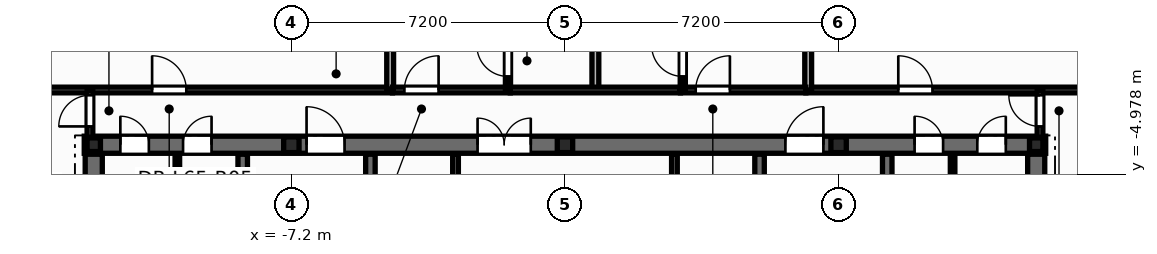
"""IFC4 building model, lengths in metres.
Left out: names, types, materials, properties, quantities, classifications, styles, units other than length and angle.
Written with IfcOpenShell. Run it as: python <this file> out.ifc"""

import sys

from ifc_helpers import new_model, si_unit, direction, frame, frame_2d, origin, origin_2d, place, context, subcontext, project, spatial, rectangle, i_section, extrude, element, fill, save


model = new_model("IFC4")
c1 = context("Model", 3, precision=1e-05, world=origin(), true_north=direction((0.0, 1.0)))
c2 = subcontext(c1, "Body", "Model", "MODEL_VIEW")
j1 = project(units=[si_unit("LENGTHUNIT", "METRE"), si_unit("PLANEANGLEUNIT", "RADIAN")], contexts=[c1])
p1 = place(None, origin())
s1 = spatial("IfcSite", under=j1, at=p1, CompositionType="ELEMENT")
p2 = place(p1, origin())
s2 = spatial("IfcBuilding", under=s1, at=p2, CompositionType="ELEMENT")
p3 = place(p2, frame((0.0, 0.0, 249.0)))
s3 = spatial("IfcBuildingStorey", under=s2, at=p3, CompositionType="ELEMENT", Elevation=249.0)
for number, where, z_axis, x_axis in (
    (1, (12.4, -4.2, 0.0), (0.0, 0.0, 1.0), (1.0, 0.0, 0.0)),
    (2, (-12.4, -4.2, 0.0), (0.0, 0.0, 1.0), (1.0, 0.0, 0.0)),
):
    element("IfcColumn", number, at=place(p3, frame(where, z_axis=z_axis, x_axis=x_axis)), inside=s3, PredefinedType="COLUMN", context=c2, shape_type="SweptSolid", body=[
        extrude(i_section(OverallWidth=0.352, OverallDepth=0.359, WebThickness=0.018, FlangeThickness=0.026, at=origin_2d()), origin(), (0.0, 0.0, 1.0), 3.6),
    ])
for number, where, z_axis, x_axis in (
    (3, (-7.2, -4.2, 0.0), (0.0, 0.0, 1.0), (1.0, 0.0, 0.0)),
    (4, (0.0, -4.2, 0.0), (0.0, 0.0, 1.0), (1.0, 0.0, 0.0)),
    (5, (7.2, -4.2, 0.0), (0.0, 0.0, 1.0), (1.0, 0.0, 0.0)),
):
    element("IfcColumn", number, at=place(p3, frame(where, z_axis=z_axis, x_axis=x_axis)), inside=s3, PredefinedType="PILASTER", context=c2, shape_type="SweptSolid", body=[
        extrude(i_section(OverallWidth=0.405, OverallDepth=0.414, WebThickness=0.022, FlangeThickness=0.032, at=origin_2d()), origin(), (0.0, 0.0, 1.0), 3.6),
    ])
p4 = place(p3, frame((-11.468, 1.637, -0.2), z_axis=(0.0, 0.0, 1.0), x_axis=(-0.582200027891, -0.813045587605, 0.0)))
e6 = element("IfcWall", 6, at=p4, inside=s3, PredefinedType="PARAPET", context=c2, shape_type="SweptSolid", body=[
    extrude(rectangle(XDim=16.608, YDim=0.36, at=frame_2d((8.304, 0.0))), origin(), (0.0, 0.0, 1.0), 0.38),
])
p5 = place(p3, frame((-2.88, -7.1, 0.0), z_axis=(0.0, 0.0, 1.0), x_axis=(0.0, 1.0, 0.0)))
e7 = element("IfcWall", 7, at=p5, inside=s3, PredefinedType="PARTITIONING", context=c2, shape_type="SweptSolid", body=[
    extrude(rectangle(XDim=2.65, YDim=0.15, at=frame_2d((1.325, 0.0))), origin(), (0.0, 0.0, 1.0), 3.345),
])
p6 = place(p5, frame((0.85, 0.0, 0.0)))
e8 = element("IfcOpeningElement", 8, at=p6, cuts=e7, PredefinedType="OPENING", context=c2, shape_type="SweptSolid", body=[
    extrude(rectangle(XDim=0.886, YDim=2.104, at=frame_2d((0.44, 1.052))), frame((0.0, 0.085, 0.0), z_axis=(0.0, -1.0, 0.0), x_axis=(1.0, 0.0, 0.0)), (0.0, 0.0, 1.0), 0.17),
])
p7 = place(p3, frame((2.88, -7.1, 0.0), z_axis=(0.0, 0.0, 1.0), x_axis=(0.0, 1.0, 0.0)))
e9 = element("IfcWall", 9, at=p7, inside=s3, PredefinedType="PARTITIONING", context=c2, shape_type="SweptSolid", body=[
    extrude(rectangle(XDim=2.65, YDim=0.15, at=frame_2d((1.325, 0.0))), origin(), (0.0, 0.0, 1.0), 3.345),
])
p8 = place(p7, frame((0.85, 0.0, 0.0)))
e10 = element("IfcOpeningElement", 10, at=p8, cuts=e9, PredefinedType="OPENING", context=c2, shape_type="SweptSolid", body=[
    extrude(rectangle(XDim=0.886, YDim=2.104, at=frame_2d((0.44, 1.052))), frame((0.0, 0.085, 0.0), z_axis=(0.0, -1.0, 0.0), x_axis=(1.0, 0.0, 0.0)), (0.0, 0.0, 1.0), 0.17),
])
for number, where, z_axis, x_axis in (
    (11, (-10.2, -5.52, 0.0), (0.0, 0.0, 1.0), (0.0, 1.0, 0.0)),
    (12, (10.2, -5.52, 0.0), (0.0, 0.0, 1.0), (0.0, 1.0, 0.0)),
):
    element("IfcWall", number, at=place(p3, frame(where, z_axis=z_axis, x_axis=x_axis)), inside=s3, PredefinedType="PARTITIONING", context=c2, shape_type="SweptSolid", body=[
        extrude(rectangle(XDim=1.12, YDim=0.12, at=frame_2d((0.56, 0.0))), origin(), (0.0, 0.0, 1.0), 3.345),
    ])
p9 = place(p3, frame((-12.65, -4.2, 0.0), z_axis=(0.0, 0.0, 1.0), x_axis=(1.0, 0.0, 0.0)))
e13 = element("IfcWall", 13, at=p9, inside=s3, PredefinedType="SHEAR", context=c2, shape_type="SweptSolid", body=[
    extrude(rectangle(XDim=25.3, YDim=0.45, at=frame_2d((12.65, 0.0))), origin(), (0.0, 0.0, 1.0), 3.6),
])
p10 = place(p9, frame((0.95, 0.0, 0.0)))
e14 = element("IfcOpeningElement", 14, at=p10, cuts=e13, PredefinedType="OPENING", context=c2, shape_type="SweptSolid", body=[
    extrude(rectangle(XDim=0.756, YDim=2.054, at=frame_2d((0.375, 1.027))), frame((0.0, 0.235, 0.0), z_axis=(0.0, -1.0, 0.0), x_axis=(1.0, 0.0, 0.0)), (0.0, 0.0, 1.0), 0.47),
])
p11 = place(p9, frame((2.6, 0.0, 0.0)))
e15 = element("IfcOpeningElement", 15, at=p11, cuts=e13, PredefinedType="OPENING", context=c2, shape_type="SweptSolid", body=[
    extrude(rectangle(XDim=0.756, YDim=2.054, at=frame_2d((0.375, 1.027))), frame((0.0, 0.235, 0.0), z_axis=(0.0, -1.0, 0.0), x_axis=(1.0, 0.0, 0.0)), (0.0, 0.0, 1.0), 0.47),
])
p12 = place(p9, frame((21.85, 0.0, 0.0)))
e16 = element("IfcOpeningElement", 16, at=p12, cuts=e13, PredefinedType="OPENING", context=c2, shape_type="SweptSolid", body=[
    extrude(rectangle(XDim=0.756, YDim=2.054, at=frame_2d((0.375, 1.027))), frame((0.0, 0.235, 0.0), z_axis=(0.0, -1.0, 0.0), x_axis=(1.0, 0.0, 0.0)), (0.0, 0.0, 1.0), 0.47),
])
p13 = place(p9, frame((23.5, 0.0, 0.0)))
e17 = element("IfcOpeningElement", 17, at=p13, cuts=e13, PredefinedType="OPENING", context=c2, shape_type="SweptSolid", body=[
    extrude(rectangle(XDim=0.756, YDim=2.054, at=frame_2d((0.375, 1.027))), frame((0.0, 0.235, 0.0), z_axis=(0.0, -1.0, 0.0), x_axis=(1.0, 0.0, 0.0)), (0.0, 0.0, 1.0), 0.47),
])
p14 = place(p9, frame((5.85, 0.0, 0.0)))
e18 = element("IfcOpeningElement", 18, at=p14, cuts=e13, PredefinedType="OPENING", context=c2, shape_type="SweptSolid", body=[
    extrude(rectangle(XDim=1.006, YDim=2.104, at=frame_2d((0.5, 1.052))), frame((0.0, 0.235, 0.0), z_axis=(0.0, -1.0, 0.0), x_axis=(1.0, 0.0, 0.0)), (0.0, 0.0, 1.0), 0.47),
])
p15 = place(p9, frame((10.35, 0.0, 0.0)))
e19 = element("IfcOpeningElement", 19, at=p15, cuts=e13, PredefinedType="OPENING", context=c2, shape_type="SweptSolid", body=[
    extrude(rectangle(XDim=1.406, YDim=2.154, at=frame_2d((0.7, 1.077))), frame((0.0, 0.235, 0.0), z_axis=(0.0, -1.0, 0.0), x_axis=(1.0, 0.0, 0.0)), (0.0, 0.0, 1.0), 0.47),
])
p16 = place(p9, frame((18.45, 0.0, 0.0)))
e20 = element("IfcOpeningElement", 20, at=p16, cuts=e13, PredefinedType="OPENING", context=c2, shape_type="SweptSolid", body=[
    extrude(rectangle(XDim=1.006, YDim=2.104, at=frame_2d((0.5, 1.052))), frame((0.0, 0.235, 0.0), z_axis=(0.0, -1.0, 0.0), x_axis=(1.0, 0.0, 0.0)), (0.0, 0.0, 1.0), 0.47),
])
p17 = place(p3, frame((-8.48, -13.85, 0.0), z_axis=(0.0, 0.0, 1.0), x_axis=(0.0, 1.0, 0.0)))
e21 = element("IfcWall", 21, at=p17, inside=s3, PredefinedType="SHEAR", context=c2, shape_type="SweptSolid", body=[
    extrude(rectangle(XDim=9.4, YDim=0.25, at=frame_2d((4.7, 0.0))), origin(), (0.0, 0.0, 1.0), 3.6),
])
p18 = place(p17, frame((6.95, 0.0, 0.0)))
e22 = element("IfcOpeningElement", 22, at=p18, cuts=e21, PredefinedType="OPENING", context=c2, shape_type="SweptSolid", body=[
    extrude(rectangle(XDim=1.006, YDim=2.104, at=frame_2d((0.5, 1.052))), frame((0.0, 0.135, 0.0), z_axis=(0.0, -1.0, 0.0), x_axis=(1.0, 0.0, 0.0)), (0.0, 0.0, 1.0), 0.27),
])
p19 = place(p3, frame((8.48, -13.85, 0.0), z_axis=(0.0, 0.0, 1.0), x_axis=(0.0, 1.0, 0.0)))
e23 = element("IfcWall", 23, at=p19, inside=s3, PredefinedType="SHEAR", context=c2, shape_type="SweptSolid", body=[
    extrude(rectangle(XDim=9.4, YDim=0.25, at=frame_2d((4.7, 0.0))), origin(), (0.0, 0.0, 1.0), 3.6),
])
p20 = place(p19, frame((6.95, 0.0, 0.0)))
e24 = element("IfcOpeningElement", 24, at=p20, cuts=e23, PredefinedType="OPENING", context=c2, shape_type="SweptSolid", body=[
    extrude(rectangle(XDim=1.006, YDim=2.104, at=frame_2d((0.5, 1.052))), frame((0.0, 0.135, 0.0), z_axis=(0.0, -1.0, 0.0), x_axis=(1.0, 0.0, 0.0)), (0.0, 0.0, 1.0), 0.27),
])
for number, where, z_axis, x_axis in (
    (25, (-5.12, -13.85, 0.0), (0.0, 0.0, 1.0), (0.0, 1.0, 0.0)),
    (26, (5.12, -13.85, 0.0), (0.0, 0.0, 1.0), (0.0, 1.0, 0.0)),
):
    element("IfcWall", number, at=place(p3, frame(where, z_axis=z_axis, x_axis=x_axis)), inside=s3, PredefinedType="SHEAR", context=c2, shape_type="SweptSolid", body=[
        extrude(rectangle(XDim=9.4, YDim=0.25, at=frame_2d((4.7, 0.0))), origin(), (0.0, 0.0, 1.0), 3.6),
    ])
for number, where, z_axis, x_axis in (
    (27, (-12.4, -13.85, 0.0), (0.0, 0.0, 1.0), (0.0, 1.0, 0.0)),
    (28, (12.4, -13.85, 0.0), (0.0, 0.0, 1.0), (0.0, 1.0, 0.0)),
):
    element("IfcWall", number, at=place(p3, frame(where, z_axis=z_axis, x_axis=x_axis)), inside=s3, PredefinedType="SHEAR", context=c2, shape_type="SweptSolid", body=[
        extrude(rectangle(XDim=9.4, YDim=0.45, at=frame_2d((4.7, 0.0))), origin(), (0.0, 0.0, 1.0), 3.6),
    ])
p21 = place(p3, frame((-14.42, -2.76, 0.0), z_axis=(0.0, 0.0, 1.0), x_axis=(1.0, 0.0, 0.0)))
e29 = element("IfcWall", 29, at=p21, inside=s3, PredefinedType="PARTITIONING", context=c2, shape_type="SweptSolid", body=[
    extrude(rectangle(XDim=9.88, YDim=0.15, at=frame_2d((4.94, 0.0))), origin(), (0.0, 0.0, 1.0), 2.32),
])
p22 = place(p21, frame((3.555, 0.0, 0.0)))
e30 = element("IfcOpeningElement", 30, at=p22, cuts=e29, PredefinedType="OPENING", context=c2, shape_type="SweptSolid", body=[
    extrude(rectangle(XDim=0.906, YDim=2.104, at=frame_2d((0.45, 1.052))), frame((0.0, 0.085, 0.0), z_axis=(0.0, -1.0, 0.0), x_axis=(1.0, 0.0, 0.0)), (0.0, 0.0, 1.0), 0.17),
])
p23 = place(p3, frame((6.34, -2.76, 0.0), z_axis=(0.0, 0.0, 1.0), x_axis=(1.0, 0.0, 0.0)))
e31 = element("IfcWall", 31, at=p23, inside=s3, PredefinedType="PARTITIONING", context=c2, shape_type="SweptSolid", body=[
    extrude(rectangle(XDim=8.08, YDim=0.15, at=frame_2d((4.04, 0.0))), origin(), (0.0, 0.0, 1.0), 2.32),
])
p24 = place(p23, frame((2.431, 0.0, 0.0)))
e32 = element("IfcOpeningElement", 32, at=p24, cuts=e31, PredefinedType="OPENING", context=c2, shape_type="SweptSolid", body=[
    extrude(rectangle(XDim=0.906, YDim=2.104, at=frame_2d((0.45, 1.052))), frame((0.0, 0.085, 0.0), z_axis=(0.0, -1.0, 0.0), x_axis=(1.0, 0.0, 0.0)), (0.0, 0.0, 1.0), 0.17),
])
p25 = place(p3, frame((-4.6, -2.74, 0.0), z_axis=(0.0, 0.0, 1.0), x_axis=(0.0, 1.0, 0.0)))
e33 = element("IfcWall", 33, at=p25, inside=s3, PredefinedType="PARTITIONING", context=c2, shape_type="SweptSolid", body=[
    extrude(rectangle(XDim=12.74, YDim=0.18, at=frame_2d((6.37, 0.0))), origin(), (0.0, 0.0, 1.0), 2.32),
])
p26 = place(p3, frame((6.4, -2.76, 0.0), z_axis=(0.0, 0.0, 1.0), x_axis=(0.0, 1.0, 0.0)))
e34 = element("IfcWall", 34, at=p26, inside=s3, PredefinedType="PARTITIONING", context=c2, shape_type="SweptSolid", body=[
    extrude(rectangle(XDim=11.2, YDim=0.18, at=frame_2d((5.6, 0.0))), origin(), (0.0, 0.0, 1.0), 2.32),
])
p27 = place(p3, frame((0.8, -2.76, 0.0), z_axis=(0.0, 0.0, 1.0), x_axis=(0.0, 1.0, 0.0)))
e35 = element("IfcWall", 35, at=p27, inside=s3, PredefinedType="PARTITIONING", context=c2, shape_type="SweptSolid", body=[
    extrude(rectangle(XDim=16.697, YDim=0.18, at=frame_2d((8.348, 0.0))), origin(), (0.0, 0.0, 1.0), 2.32),
])
p28 = place(p3, frame((3.04, -2.76, 0.0), z_axis=(0.0, 0.0, 1.0), x_axis=(1.0, 0.0, 0.0)))
e36 = element("IfcWall", 36, at=p28, inside=s3, PredefinedType="PARTITIONING", context=c2, shape_type="SweptSolid", body=[
    extrude(rectangle(XDim=3.298, YDim=0.15, at=frame_2d((1.649, 0.0))), origin(), (0.0, 0.0, 1.0), 2.964),
])
p29 = place(p28, frame((0.4, 0.0, 0.0)))
e37 = element("IfcOpeningElement", 37, at=p29, cuts=e36, PredefinedType="OPENING", context=c2, shape_type="SweptSolid", body=[
    extrude(rectangle(XDim=0.906, YDim=2.104, at=frame_2d((0.45, 1.052))), frame((0.0, 0.085, 0.0), z_axis=(0.0, -1.0, 0.0), x_axis=(1.0, 0.0, 0.0)), (0.0, 0.0, 1.0), 0.17),
])
p30 = place(p3, frame((-4.538, -2.76, 0.0), z_axis=(0.0, 0.0, 1.0), x_axis=(1.0, 0.0, 0.0)))
e38 = element("IfcWall", 38, at=p30, inside=s3, PredefinedType="PARTITIONING", context=c2, shape_type="SweptSolid", body=[
    extrude(rectangle(XDim=3.098, YDim=0.15, at=frame_2d((1.549, 0.0))), origin(), (0.0, 0.0, 1.0), 2.964),
])
p31 = place(p30, frame((0.312, 0.0, 0.0)))
e39 = element("IfcOpeningElement", 39, at=p31, cuts=e38, PredefinedType="OPENING", context=c2, shape_type="SweptSolid", body=[
    extrude(rectangle(XDim=0.906, YDim=2.104, at=frame_2d((0.45, 1.052))), frame((0.0, 0.085, 0.0), z_axis=(0.0, -1.0, 0.0), x_axis=(1.0, 0.0, 0.0)), (0.0, 0.0, 1.0), 0.17),
])
p32 = place(p3, frame((-1.5, -2.76, 0.0), z_axis=(0.0, 0.0, 1.0), x_axis=(0.0, 1.0, 0.0)))
e40 = element("IfcWall", 40, at=p32, inside=s3, PredefinedType="PARTITIONING", context=c2, shape_type="SweptSolid", body=[
    extrude(rectangle(XDim=2.92, YDim=0.135, at=frame_2d((1.46, 0.0))), origin(), (0.0, 0.0, 1.0), 3.345),
])
p33 = place(p32, frame((0.357, 0.0, 0.0)))
e41 = element("IfcOpeningElement", 41, at=p33, cuts=e40, PredefinedType="OPENING", context=c2, shape_type="SweptSolid", body=[
    extrude(rectangle(XDim=0.826, YDim=2.104, at=frame_2d((0.41, 1.052))), frame((0.0, 0.078, 0.0), z_axis=(0.0, -1.0, 0.0), x_axis=(1.0, 0.0, 0.0)), (0.0, 0.0, 1.0), 0.155),
])
p34 = place(p3, frame((3.1, -2.76, 0.0), z_axis=(0.0, 0.0, 1.0), x_axis=(0.0, 1.0, 0.0)))
e42 = element("IfcWall", 42, at=p34, inside=s3, PredefinedType="PARTITIONING", context=c2, shape_type="SweptSolid", body=[
    extrude(rectangle(XDim=2.92, YDim=0.135, at=frame_2d((1.46, 0.0))), origin(), (0.0, 0.0, 1.0), 3.345),
])
p35 = place(p34, frame((0.357, 0.0, 0.0)))
e43 = element("IfcOpeningElement", 43, at=p35, cuts=e42, PredefinedType="OPENING", context=c2, shape_type="SweptSolid", body=[
    extrude(rectangle(XDim=0.826, YDim=2.104, at=frame_2d((0.41, 1.052))), frame((0.0, 0.078, 0.0), z_axis=(0.0, -1.0, 0.0), x_axis=(1.0, 0.0, 0.0)), (0.0, 0.0, 1.0), 0.155),
])
p36 = place(p3, frame((-1.438, -2.76, 0.0), z_axis=(0.0, 0.0, 1.0), x_axis=(1.0, 0.0, 0.0)))
e44 = element("IfcWall", 44, at=p36, inside=s3, PredefinedType="PARTITIONING", context=c2, shape_type="SweptSolid", body=[
    extrude(rectangle(XDim=4.476, YDim=0.15, at=frame_2d((2.238, 0.0))), origin(), (0.0, 0.0, 1.0), 2.32),
])
p37 = place(p3, frame((-12.5, -4.24, 0.0), z_axis=(0.0, 0.0, 1.0), x_axis=(0.0, 1.0, 0.0)))
e45 = element("IfcWall", 45, at=p37, inside=s3, PredefinedType="PARTITIONING", context=c2, shape_type="SweptSolid", body=[
    extrude(rectangle(XDim=1.48, YDim=0.15, at=frame_2d((0.74, 0.0))), origin(), (0.0, 0.0, 1.0), 2.32),
])
p38 = place(p37, frame((0.522, 0.0, 0.0)))
e46 = element("IfcOpeningElement", 46, at=p38, cuts=e45, PredefinedType="OPENING", context=c2, shape_type="SweptSolid", body=[
    extrude(rectangle(XDim=0.826, YDim=2.104, at=frame_2d((0.41, 1.052))), frame((0.0, 0.085, 0.0), z_axis=(0.0, -1.0, 0.0), x_axis=(1.0, 0.0, 0.0)), (0.0, 0.0, 1.0), 0.17),
])
p39 = place(p3, frame((12.5, -4.24, 0.0), z_axis=(0.0, 0.0, 1.0), x_axis=(0.0, 1.0, 0.0)))
e47 = element("IfcWall", 47, at=p39, inside=s3, PredefinedType="PARTITIONING", context=c2, shape_type="SweptSolid", body=[
    extrude(rectangle(XDim=1.48, YDim=0.15, at=frame_2d((0.74, 0.0))), origin(), (0.0, 0.0, 1.0), 2.32),
])
p40 = place(p39, frame((0.522, 0.0, 0.0)))
e48 = element("IfcOpeningElement", 48, at=p40, cuts=e47, PredefinedType="OPENING", context=c2, shape_type="SweptSolid", body=[
    extrude(rectangle(XDim=0.826, YDim=2.104, at=frame_2d((0.41, 1.052))), frame((0.0, 0.085, 0.0), z_axis=(0.0, -1.0, 0.0), x_axis=(1.0, 0.0, 0.0)), (0.0, 0.0, 1.0), 0.17),
])
p41 = place(p10, origin())
e49 = element("IfcDoor", 49, at=p41, inside=s3, OperationType="SINGLE_SWING_LEFT", PredefinedType="DOOR", context=c2, shape_type="SweptSolid", body=[
    extrude(rectangle(XDim=0.75, YDim=2.05, at=frame_2d((0.375, 1.025))), frame((0.0, 0.025, 0.0), z_axis=(0.0, -1.0, 0.0), x_axis=(1.0, 0.0, 0.0)), (0.0, 0.0, 1.0), 0.05),
])
fill(e14, e49)
p42 = place(p11, origin())
e50 = element("IfcDoor", 50, at=p42, inside=s3, OperationType="SINGLE_SWING_RIGHT", PredefinedType="DOOR", context=c2, shape_type="SweptSolid", body=[
    extrude(rectangle(XDim=0.75, YDim=2.05, at=frame_2d((0.375, 1.025))), frame((0.0, 0.025, 0.0), z_axis=(0.0, -1.0, 0.0), x_axis=(1.0, 0.0, 0.0)), (0.0, 0.0, 1.0), 0.05),
])
fill(e15, e50)
p43 = place(p12, origin())
e51 = element("IfcDoor", 51, at=p43, inside=s3, OperationType="SINGLE_SWING_LEFT", PredefinedType="DOOR", context=c2, shape_type="SweptSolid", body=[
    extrude(rectangle(XDim=0.75, YDim=2.05, at=frame_2d((0.375, 1.025))), frame((0.0, 0.025, 0.0), z_axis=(0.0, -1.0, 0.0), x_axis=(1.0, 0.0, 0.0)), (0.0, 0.0, 1.0), 0.05),
])
fill(e16, e51)
p44 = place(p13, origin())
e52 = element("IfcDoor", 52, at=p44, inside=s3, OperationType="SINGLE_SWING_RIGHT", PredefinedType="DOOR", context=c2, shape_type="SweptSolid", body=[
    extrude(rectangle(XDim=0.75, YDim=2.05, at=frame_2d((0.375, 1.025))), frame((0.0, 0.025, 0.0), z_axis=(0.0, -1.0, 0.0), x_axis=(1.0, 0.0, 0.0)), (0.0, 0.0, 1.0), 0.05),
])
fill(e17, e52)
p45 = place(p14, origin())
e53 = element("IfcDoor", 53, at=p45, inside=s3, OperationType="SINGLE_SWING_LEFT", PredefinedType="DOOR", context=c2, shape_type="SweptSolid", body=[
    extrude(rectangle(XDim=1.0, YDim=2.1, at=frame_2d((0.5, 1.05))), frame((0.0, 0.025, 0.0), z_axis=(0.0, -1.0, 0.0), x_axis=(1.0, 0.0, 0.0)), (0.0, 0.0, 1.0), 0.05),
])
fill(e18, e53)
p46 = place(p15, origin())
e54 = element("IfcDoor", 54, at=p46, inside=s3, OperationType="DOUBLE_DOOR_SINGLE_SWING", PredefinedType="DOOR", context=c2, shape_type="SweptSolid", body=[
    extrude(rectangle(XDim=1.4, YDim=2.15, at=frame_2d((0.7, 1.075))), frame((0.0, 0.025, 0.0), z_axis=(0.0, -1.0, 0.0), x_axis=(1.0, 0.0, 0.0)), (0.0, 0.0, 1.0), 0.05),
])
fill(e19, e54)
p47 = place(p16, origin())
e55 = element("IfcDoor", 55, at=p47, inside=s3, OperationType="SINGLE_SWING_RIGHT", PredefinedType="DOOR", context=c2, shape_type="SweptSolid", body=[
    extrude(rectangle(XDim=1.0, YDim=2.1, at=frame_2d((0.5, 1.05))), frame((0.0, 0.025, 0.0), z_axis=(0.0, -1.0, 0.0), x_axis=(1.0, 0.0, 0.0)), (0.0, 0.0, 1.0), 0.05),
])
fill(e20, e55)
p48 = place(p38, origin())
e56 = element("IfcDoor", 56, at=p48, inside=s3, OperationType="SINGLE_SWING_LEFT", PredefinedType="DOOR", context=c2, shape_type="SweptSolid", body=[
    extrude(rectangle(XDim=0.82, YDim=2.1, at=frame_2d((0.41, 1.05))), frame((0.0, 0.025, 0.0), z_axis=(0.0, -1.0, 0.0), x_axis=(1.0, 0.0, 0.0)), (0.0, 0.0, 1.0), 0.05),
])
fill(e46, e56)
p49 = place(p40, origin())
e57 = element("IfcDoor", 57, at=p49, inside=s3, OperationType="SINGLE_SWING_RIGHT", PredefinedType="DOOR", context=c2, shape_type="SweptSolid", body=[
    extrude(rectangle(XDim=0.82, YDim=2.1, at=frame_2d((0.41, 1.05))), frame((0.0, 0.025, 0.0), z_axis=(0.0, -1.0, 0.0), x_axis=(1.0, 0.0, 0.0)), (0.0, 0.0, 1.0), 0.05),
])
fill(e48, e57)
p50 = place(p22, origin())
e58 = element("IfcDoor", 58, at=p50, inside=s3, OperationType="SINGLE_SWING_LEFT", PredefinedType="DOOR", context=c2, shape_type="SweptSolid", body=[
    extrude(rectangle(XDim=0.9, YDim=2.1, at=frame_2d((0.45, 1.05))), frame((0.0, 0.025, 0.0), z_axis=(0.0, -1.0, 0.0), x_axis=(1.0, 0.0, 0.0)), (0.0, 0.0, 1.0), 0.05),
])
fill(e30, e58)
p51 = place(p33, origin())
e59 = element("IfcDoor", 59, at=p51, inside=s3, OperationType="SINGLE_SWING_RIGHT", PredefinedType="DOOR", context=c2, shape_type="SweptSolid", body=[
    extrude(rectangle(XDim=0.82, YDim=2.1, at=frame_2d((0.41, 1.05))), frame((0.0, 0.025, 0.0), z_axis=(0.0, -1.0, 0.0), x_axis=(1.0, 0.0, 0.0)), (0.0, 0.0, 1.0), 0.05),
])
fill(e41, e59)
p52 = place(p31, origin())
e60 = element("IfcDoor", 60, at=p52, inside=s3, OperationType="SINGLE_SWING_RIGHT", PredefinedType="DOOR", context=c2, shape_type="SweptSolid", body=[
    extrude(rectangle(XDim=0.9, YDim=2.1, at=frame_2d((0.45, 1.05))), frame((0.0, 0.025, 0.0), z_axis=(0.0, -1.0, 0.0), x_axis=(1.0, 0.0, 0.0)), (0.0, 0.0, 1.0), 0.05),
])
fill(e39, e60)
p53 = place(p35, origin())
e61 = element("IfcDoor", 61, at=p53, inside=s3, OperationType="SINGLE_SWING_RIGHT", PredefinedType="DOOR", context=c2, shape_type="SweptSolid", body=[
    extrude(rectangle(XDim=0.82, YDim=2.1, at=frame_2d((0.41, 1.05))), frame((0.0, 0.025, 0.0), z_axis=(0.0, -1.0, 0.0), x_axis=(1.0, 0.0, 0.0)), (0.0, 0.0, 1.0), 0.05),
])
fill(e43, e61)
p54 = place(p29, origin())
e62 = element("IfcDoor", 62, at=p54, inside=s3, OperationType="SINGLE_SWING_RIGHT", PredefinedType="DOOR", context=c2, shape_type="SweptSolid", body=[
    extrude(rectangle(XDim=0.9, YDim=2.1, at=frame_2d((0.45, 1.05))), frame((0.0, 0.025, 0.0), z_axis=(0.0, -1.0, 0.0), x_axis=(1.0, 0.0, 0.0)), (0.0, 0.0, 1.0), 0.05),
])
fill(e37, e62)
p55 = place(p24, origin())
e63 = element("IfcDoor", 63, at=p55, inside=s3, OperationType="SINGLE_SWING_LEFT", PredefinedType="DOOR", context=c2, shape_type="SweptSolid", body=[
    extrude(rectangle(XDim=0.9, YDim=2.1, at=frame_2d((0.45, 1.05))), frame((0.0, 0.025, 0.0), z_axis=(0.0, -1.0, 0.0), x_axis=(1.0, 0.0, 0.0)), (0.0, 0.0, 1.0), 0.05),
])
fill(e32, e63)
save(model, sys.argv[1])
